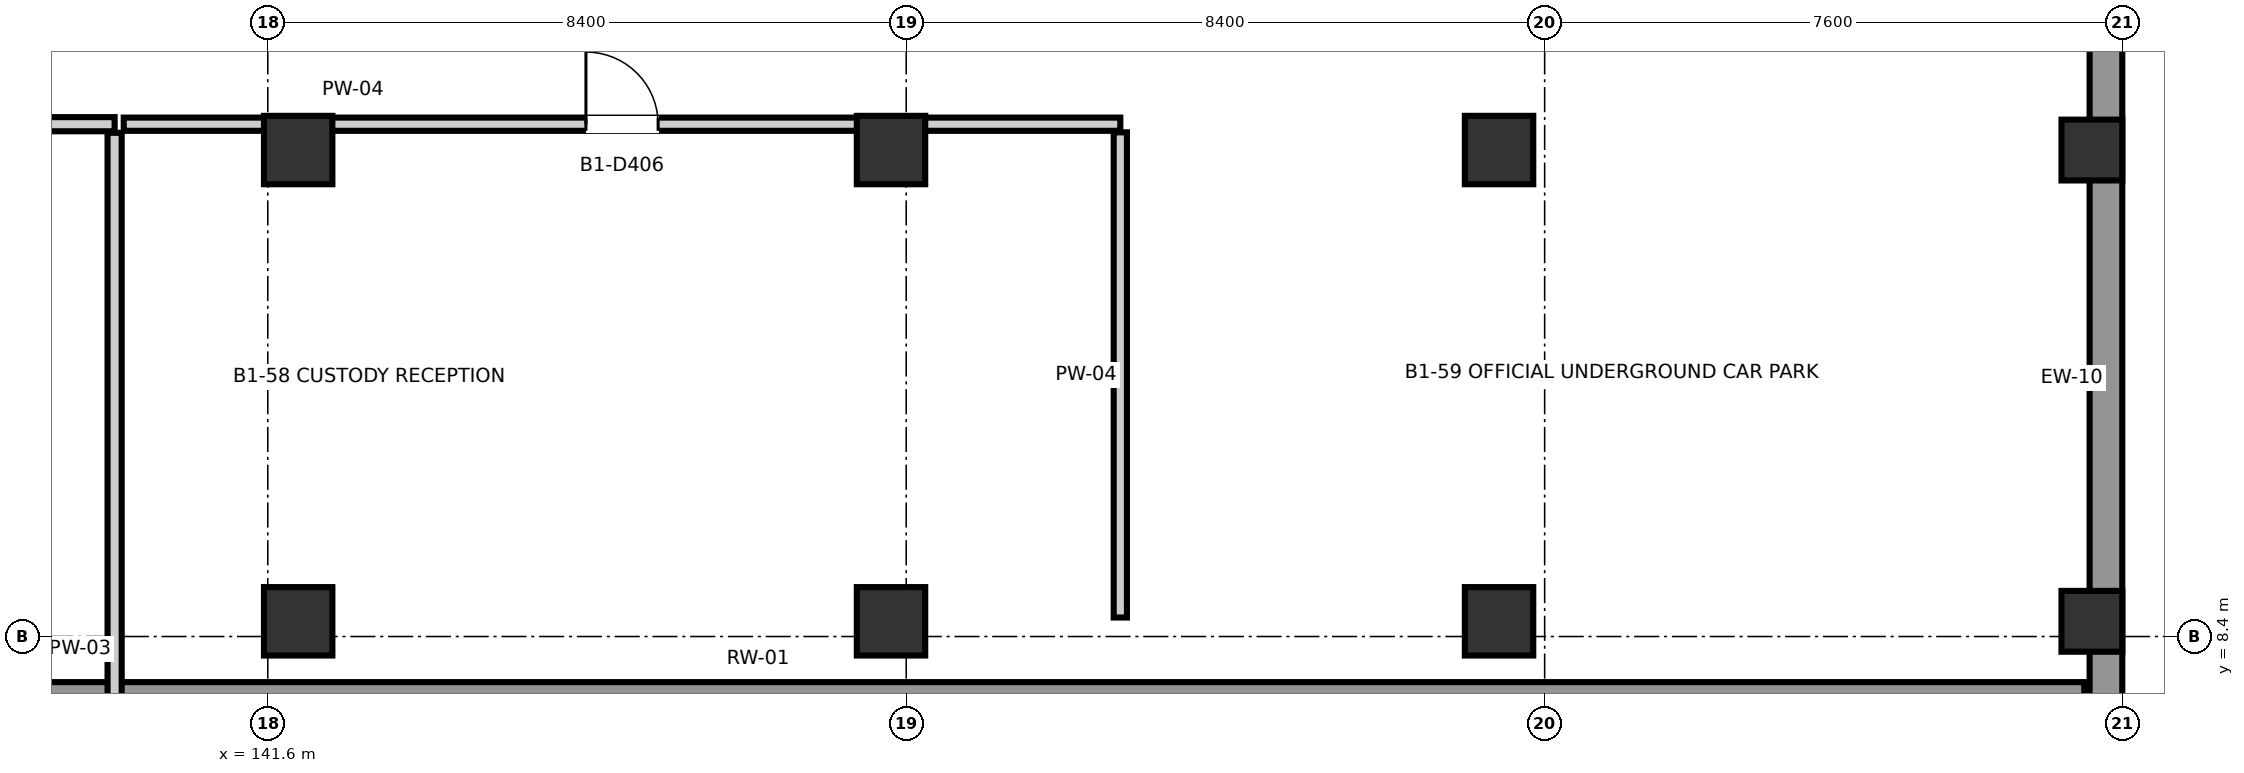
"""IFC4 building model, lengths in metres.
Left out: names, types, materials, properties, quantities, classifications, styles, units other than length and angle.
Written with IfcOpenShell. Run it as: python <this file> out.ifc"""

import sys

from ifc_helpers import new_model, si_unit, direction, frame, frame_2d, origin, origin_2d, place, context, subcontext, project, spatial, rectangle, extrude, element, fill, save


model = new_model("IFC4")
c1 = context("Model", 3, precision=1e-05, world=origin(), true_north=direction((0.0, 1.0)))
c2 = subcontext(c1, "Body", "Model", "MODEL_VIEW")
j1 = project(units=[si_unit("LENGTHUNIT", "METRE"), si_unit("PLANEANGLEUNIT", "RADIAN")], contexts=[c1])
p1 = place(None, origin())
s1 = spatial("IfcSite", under=j1, at=p1, CompositionType="ELEMENT")
p2 = place(p1, origin())
s2 = spatial("IfcBuilding", under=s1, at=p2, CompositionType="ELEMENT")
p3 = place(p2, frame((0.0, 0.0, -4.2)))
s3 = spatial("IfcBuildingStorey", under=s2, at=p3, CompositionType="ELEMENT", Elevation=-4.2)
for number, where, z_axis, x_axis in (
    (1, (142.0, 8.6, 0.0), (0.0, 0.0, 1.0), (1.0, 0.0, 0.0)),
    (2, (142.0, 14.8, 0.0), (0.0, 0.0, 1.0), (1.0, 0.0, 0.0)),
    (3, (149.8, 8.6, 0.0), (0.0, 0.0, 1.0), (1.0, 0.0, 0.0)),
    (4, (149.8, 14.8, 0.0), (0.0, 0.0, 1.0), (1.0, 0.0, 0.0)),
    (5, (157.8, 8.6, 0.0), (0.0, 0.0, 1.0), (1.0, 0.0, 0.0)),
    (6, (157.8, 14.8, 0.0), (0.0, 0.0, 1.0), (1.0, 0.0, 0.0)),
):
    element("IfcColumn", number, at=place(p3, frame(where, z_axis=z_axis, x_axis=x_axis)), inside=s3, PredefinedType="COLUMN", context=c2, shape_type="SweptSolid", body=[
        extrude(rectangle(XDim=0.9, YDim=0.9, at=origin_2d()), origin(), (0.0, 0.0, 1.0), 4.2),
    ])
for number, where, z_axis, x_axis in (
    (7, (165.6, 8.6, 0.0), (0.0, 0.0, 1.0), (1.0, 0.0, 0.0)),
    (8, (165.6, 14.8, 0.0), (0.0, 0.0, 1.0), (1.0, 0.0, 0.0)),
):
    element("IfcColumn", number, at=place(p3, frame(where, z_axis=z_axis, x_axis=x_axis)), inside=s3, PredefinedType="COLUMN", context=c2, shape_type="SweptSolid", body=[
        extrude(rectangle(XDim=0.8, YDim=0.8, at=origin_2d()), origin(), (0.0, 0.0, 1.0), 4.2),
    ])
p4 = place(p3, frame((165.785, 1.0, 0.0), z_axis=(0.0, 0.0, 1.0), x_axis=(0.0, 1.0, 0.0)))
e9 = element("IfcWall", 9, at=p4, inside=s3, PredefinedType="SOLIDWALL", context=c2, shape_type="SweptSolid", body=[
    extrude(rectangle(XDim=21.6, YDim=0.43, at=frame_2d((10.8, 0.0))), origin(), (0.0, 0.0, 1.0), 4.2),
])
p5 = place(p3, frame((130.6, 7.66, 0.0), z_axis=(0.0, 0.0, 1.0), x_axis=(1.0, 0.0, 0.0)))
e10 = element("IfcWall", 10, at=p5, inside=s3, PredefinedType="SOLIDWALL", context=c2, shape_type="SweptSolid", body=[
    extrude(rectangle(XDim=34.9, YDim=0.28, at=frame_2d((17.45, 0.0))), origin(), (0.0, 0.0, 1.0), 4.2),
])
p6 = place(p3, frame((127.04, 15.14, 0.0), z_axis=(0.0, 0.0, 1.0), x_axis=(1.0, 0.0, 0.0)))
e11 = element("IfcWall", 11, at=p6, inside=s3, PredefinedType="PARTITIONING", context=c2, shape_type="SweptSolid", body=[
    extrude(rectangle(XDim=12.545, YDim=0.186, at=frame_2d((6.272, 0.0))), origin(), (0.0, 0.0, 1.0), 3.24),
])
p7 = place(p6, frame((4.597, 0.0, 0.0)))
e12 = element("IfcOpeningElement", 12, at=p7, cuts=e11, PredefinedType="OPENING", context=c2, shape_type="SweptSolid", body=[
    extrude(rectangle(XDim=0.95, YDim=2.12, at=frame_2d((0.475, 1.06))), frame((0.0, 0.108, 0.0), z_axis=(0.0, -1.0, 0.0), x_axis=(1.0, 0.0, 0.0)), (0.0, 0.0, 1.0), 0.216),
])
p8 = place(p3, frame((139.585, 1.44, 0.0), z_axis=(0.0, 0.0, 1.0), x_axis=(0.0, 1.0, 0.0)))
e13 = element("IfcWall", 13, at=p8, inside=s3, PredefinedType="PARTITIONING", context=c2, shape_type="SweptSolid", body=[
    extrude(rectangle(XDim=13.587, YDim=0.186, at=frame_2d((6.793, 0.0))), origin(), (0.0, 0.0, 1.0), 3.86),
])
p9 = place(p3, frame((139.705, 15.14, 0.0), z_axis=(0.0, 0.0, 1.0), x_axis=(1.0, 0.0, 0.0)))
e14 = element("IfcWall", 14, at=p9, inside=s3, PredefinedType="PARTITIONING", context=c2, shape_type="SweptSolid", body=[
    extrude(rectangle(XDim=13.112, YDim=0.174, at=frame_2d((6.556, 0.0))), origin(), (0.0, 0.0, 1.0), 3.09),
])
p10 = place(p9, frame((6.081, 0.0, 0.0)))
e15 = element("IfcOpeningElement", 15, at=p10, cuts=e14, PredefinedType="OPENING", context=c2, shape_type="SweptSolid", body=[
    extrude(rectangle(XDim=0.95, YDim=2.12, at=frame_2d((0.475, 1.06))), frame((0.0, 0.102, 0.0), z_axis=(0.0, -1.0, 0.0), x_axis=(1.0, 0.0, 0.0)), (0.0, 0.0, 1.0), 0.204),
])
p11 = place(p3, frame((152.817, 8.65, 0.0), z_axis=(0.0, 0.0, 1.0), x_axis=(0.0, 1.0, 0.0)))
e16 = element("IfcWall", 16, at=p11, inside=s3, PredefinedType="PARTITIONING", context=c2, shape_type="SweptSolid", body=[
    extrude(rectangle(XDim=6.383, YDim=0.174, at=frame_2d((3.191, 0.0))), origin(), (0.0, 0.0, 1.0), 3.86),
])
p12 = place(p10, frame((0.95, 0.0, 0.0), z_axis=(0.0, 0.0, 1.0), x_axis=(-1.0, 0.0, 0.0)))
e17 = element("IfcDoor", 17, at=p12, inside=s3, OperationType="SINGLE_SWING_LEFT", PredefinedType="DOOR", context=c2, shape_type="SweptSolid", body=[
    extrude(rectangle(XDim=0.95, YDim=2.12, at=frame_2d((0.475, 1.06))), frame((0.0, 0.025, 0.0), z_axis=(0.0, -1.0, 0.0), x_axis=(1.0, 0.0, 0.0)), (0.0, 0.0, 1.0), 0.05),
])
fill(e15, e17)
save(model, sys.argv[1])
